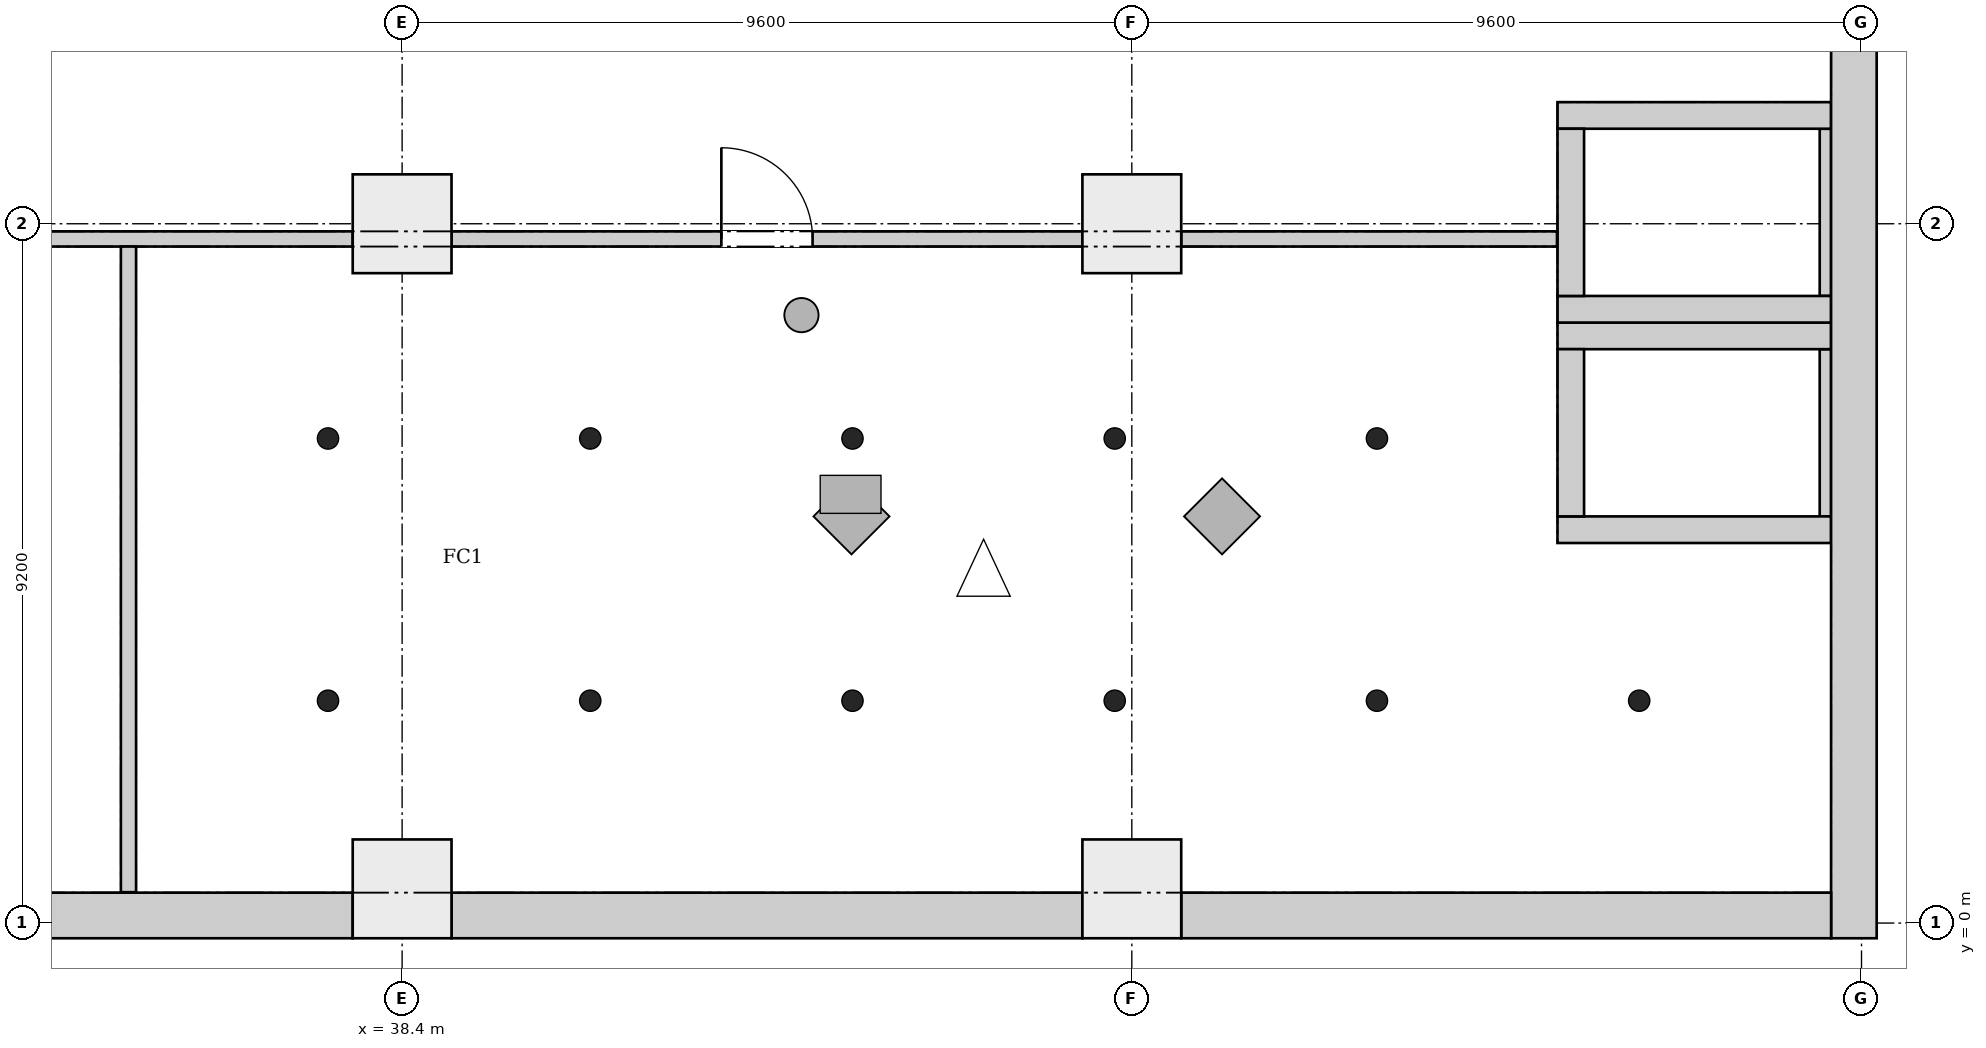
"""IFC4 building model, lengths in metres.
Left out: names, types, materials, properties, quantities, classifications, styles, units other than length and angle.
Written with IfcOpenShell. Run it as: python <this file> out.ifc"""

import sys

from ifc_helpers import new_model, si_unit, direction, frame, frame_2d, origin, origin_2d, place, context, subcontext, project, spatial, rectangle, extrude, element, fill, save


model = new_model("IFC4")
c1 = context("Model", 3, precision=1e-05, world=origin(), true_north=direction((0.0, 1.0)))
c2 = subcontext(c1, "Body", "Model", "MODEL_VIEW")
j1 = project(units=[si_unit("LENGTHUNIT", "METRE"), si_unit("PLANEANGLEUNIT", "RADIAN")], contexts=[c1])
p1 = place(None, origin())
s1 = spatial("IfcSite", under=j1, at=p1, CompositionType="ELEMENT")
p2 = place(p1, origin())
s2 = spatial("IfcBuilding", under=s1, at=p2, CompositionType="ELEMENT")
p3 = place(p2, frame((0.0, 0.0, -5.5)))
s3 = spatial("IfcBuildingStorey", under=s2, at=p3, CompositionType="ELEMENT", Elevation=-5.5)
p4 = place(p3, frame((57.5, -0.2, 0.0), z_axis=(0.0, 0.0, 1.0), x_axis=(0.0, 1.0, 0.0)))
e1 = element("IfcWall", 1, at=p4, inside=s3, PredefinedType="SOLIDWALL", context=c2, shape_type="SweptSolid", body=[
    extrude(rectangle(XDim=46.88, YDim=0.6, at=frame_2d((23.44, 0.0))), origin(), (0.0, 0.0, 1.0), 5.5),
])
for number, where, z_axis, x_axis in (
    (2, (29.45, 0.1, 0.0), (0.0, 0.0, 1.0), (1.0, 0.0, 0.0)),
    (3, (39.05, 0.1, 0.0), (0.0, 0.0, 1.0), (1.0, 0.0, 0.0)),
):
    element("IfcWall", number, at=place(p3, frame(where, z_axis=z_axis, x_axis=x_axis)), inside=s3, PredefinedType="SOLIDWALL", context=c2, shape_type="SweptSolid", body=[
        extrude(rectangle(XDim=8.3, YDim=0.6, at=frame_2d((4.15, 0.0))), origin(), (0.0, 0.0, 1.0), 5.5),
    ])
p5 = place(p3, frame((48.65, 0.1, 0.0), z_axis=(0.0, 0.0, 1.0), x_axis=(1.0, 0.0, 0.0)))
e4 = element("IfcWall", 4, at=p5, inside=s3, PredefinedType="SOLIDWALL", context=c2, shape_type="SweptSolid", body=[
    extrude(rectangle(XDim=8.55, YDim=0.6, at=frame_2d((4.275, 0.0))), origin(), (0.0, 0.0, 1.0), 5.5),
])
for number, where, z_axis, x_axis in (
    (5, (53.6, 5.175, 0.0), (0.0, 0.0, 1.0), (1.0, 0.0, 0.0)),
    (6, (53.6, 7.725, 0.0), (0.0, 0.0, 1.0), (1.0, 0.0, 0.0)),
):
    element("IfcWall", number, at=place(p3, frame(where, z_axis=z_axis, x_axis=x_axis)), inside=s3, PredefinedType="SHEAR", context=c2, shape_type="SweptSolid", body=[
        extrude(rectangle(XDim=3.6, YDim=0.35, at=frame_2d((1.8, 0.0))), origin(), (0.0, 0.0, 1.0), 5.5),
    ])
p6 = place(p3, frame((53.775, 5.35, 0.0), z_axis=(0.0, 0.0, 1.0), x_axis=(0.0, 1.0, 0.0)))
e7 = element("IfcWall", 7, at=p6, inside=s3, PredefinedType="SHEAR", context=c2, shape_type="SweptSolid", body=[
    extrude(rectangle(XDim=2.2, YDim=0.35, at=frame_2d((1.1, 0.0))), origin(), (0.0, 0.0, 1.0), 5.5),
])
p7 = place(p3, frame((57.125, 5.35, 0.0), z_axis=(0.0, 0.0, 1.0), x_axis=(0.0, 1.0, 0.0)))
e8 = element("IfcWall", 8, at=p7, inside=s3, PredefinedType="SHEAR", context=c2, shape_type="SweptSolid", body=[
    extrude(rectangle(XDim=2.2, YDim=0.15, at=frame_2d((1.1, 0.0))), origin(), (0.0, 0.0, 1.0), 5.5),
])
for number, where, z_axis, x_axis in (
    (9, (53.6, 8.075, 0.0), (0.0, 0.0, 1.0), (1.0, 0.0, 0.0)),
    (10, (53.6, 10.625, 0.0), (0.0, 0.0, 1.0), (1.0, 0.0, 0.0)),
):
    element("IfcWall", number, at=place(p3, frame(where, z_axis=z_axis, x_axis=x_axis)), inside=s3, PredefinedType="SHEAR", context=c2, shape_type="SweptSolid", body=[
        extrude(rectangle(XDim=3.6, YDim=0.35, at=frame_2d((1.8, 0.0))), origin(), (0.0, 0.0, 1.0), 5.5),
    ])
p8 = place(p3, frame((53.775, 8.25, 0.0), z_axis=(0.0, 0.0, 1.0), x_axis=(0.0, 1.0, 0.0)))
e11 = element("IfcWall", 11, at=p8, inside=s3, PredefinedType="SHEAR", context=c2, shape_type="SweptSolid", body=[
    extrude(rectangle(XDim=2.2, YDim=0.35, at=frame_2d((1.1, 0.0))), origin(), (0.0, 0.0, 1.0), 5.5),
])
p9 = place(p3, frame((57.125, 8.25, 0.0), z_axis=(0.0, 0.0, 1.0), x_axis=(0.0, 1.0, 0.0)))
e12 = element("IfcWall", 12, at=p9, inside=s3, PredefinedType="SHEAR", context=c2, shape_type="SweptSolid", body=[
    extrude(rectangle(XDim=2.2, YDim=0.15, at=frame_2d((1.1, 0.0))), origin(), (0.0, 0.0, 1.0), 5.5),
])
for number, where, z_axis, x_axis in (
    (13, (38.4, 0.45, 0.0), (0.0, 0.0, 1.0), (1.0, 0.0, 0.0)),
    (14, (48.0, 0.45, 0.0), (0.0, 0.0, 1.0), (1.0, 0.0, 0.0)),
    (15, (38.4, 9.2, 0.0), (0.0, 0.0, 1.0), (1.0, 0.0, 0.0)),
    (16, (48.0, 9.2, 0.0), (0.0, 0.0, 1.0), (1.0, 0.0, 0.0)),
):
    element("IfcColumn", number, at=place(p3, frame(where, z_axis=z_axis, x_axis=x_axis)), inside=s3, PredefinedType="COLUMN", context=c2, shape_type="SweptSolid", body=[
        extrude(rectangle(XDim=1.3, YDim=1.3, at=origin_2d()), origin(), (0.0, 0.0, 1.0), 5.5),
    ])
p10 = place(p3, frame((29.45, 9.0, 0.0), z_axis=(0.0, 0.0, 1.0), x_axis=(1.0, 0.0, 0.0)))
e17 = element("IfcWall", 17, at=p10, inside=s3, PredefinedType="PARTITIONING", context=c2, shape_type="SweptSolid", body=[
    extrude(rectangle(XDim=8.3, YDim=0.2, at=frame_2d((4.15, 0.0))), origin(), (0.0, 0.0, 1.0), 5.15),
])
p11 = place(p10, frame((2.16, 0.0, 0.0)))
e18 = element("IfcOpeningElement", 18, at=p11, cuts=e17, PredefinedType="OPENING", context=c2, shape_type="SweptSolid", body=[
    extrude(rectangle(XDim=1.2, YDim=2.1, at=frame_2d((0.6, 1.05))), frame((0.0, 0.11, 0.0), z_axis=(0.0, -1.0, 0.0), x_axis=(1.0, 0.0, 0.0)), (0.0, 0.0, 1.0), 0.22),
])
p12 = place(p3, frame((34.8, 0.406, 0.0), z_axis=(0.0, 0.0, 1.0), x_axis=(0.0, 1.0, 0.0)))
e19 = element("IfcWall", 19, at=p12, inside=s3, PredefinedType="PARTITIONING", context=c2, shape_type="SweptSolid", body=[
    extrude(rectangle(XDim=8.494, YDim=0.2, at=frame_2d((4.247, 0.0))), origin(), (0.0, 0.0, 1.0), 5.15),
])
p13 = place(p3, frame((39.05, 9.0, 0.0), z_axis=(0.0, 0.0, 1.0), x_axis=(1.0, 0.0, 0.0)))
e20 = element("IfcWall", 20, at=p13, inside=s3, PredefinedType="PARTITIONING", context=c2, shape_type="SweptSolid", body=[
    extrude(rectangle(XDim=8.3, YDim=0.2, at=frame_2d((4.15, 0.0))), origin(), (0.0, 0.0, 1.0), 5.15),
])
p14 = place(p13, frame((3.55, 0.0, 0.0)))
e21 = element("IfcOpeningElement", 21, at=p14, cuts=e20, PredefinedType="OPENING", context=c2, shape_type="SweptSolid", body=[
    extrude(rectangle(XDim=1.2, YDim=2.1, at=frame_2d((0.6, 1.05))), frame((0.0, 0.11, 0.0), z_axis=(0.0, -1.0, 0.0), x_axis=(1.0, 0.0, 0.0)), (0.0, 0.0, 1.0), 0.22),
])
p15 = place(p3, frame((48.65, 9.0, 0.0), z_axis=(0.0, 0.0, 1.0), x_axis=(1.0, 0.0, 0.0)))
e22 = element("IfcWall", 22, at=p15, inside=s3, PredefinedType="PARTITIONING", context=c2, shape_type="SweptSolid", body=[
    extrude(rectangle(XDim=4.944, YDim=0.2, at=frame_2d((2.472, 0.0))), origin(), (0.0, 0.0, 1.0), 5.15),
])
p16 = place(p14, origin())
e23 = element("IfcDoor", 23, at=p16, inside=s3, OperationType="SINGLE_SWING_RIGHT", PredefinedType="DOOR", context=c2, shape_type="SweptSolid", body=[
    extrude(rectangle(XDim=1.2, YDim=2.1, at=frame_2d((0.6, 1.05))), frame((0.0, 0.025, 0.0), z_axis=(0.0, -1.0, 0.0), x_axis=(1.0, 0.0, 0.0)), (0.0, 0.0, 1.0), 0.05),
])
fill(e21, e23)
save(model, sys.argv[1])
